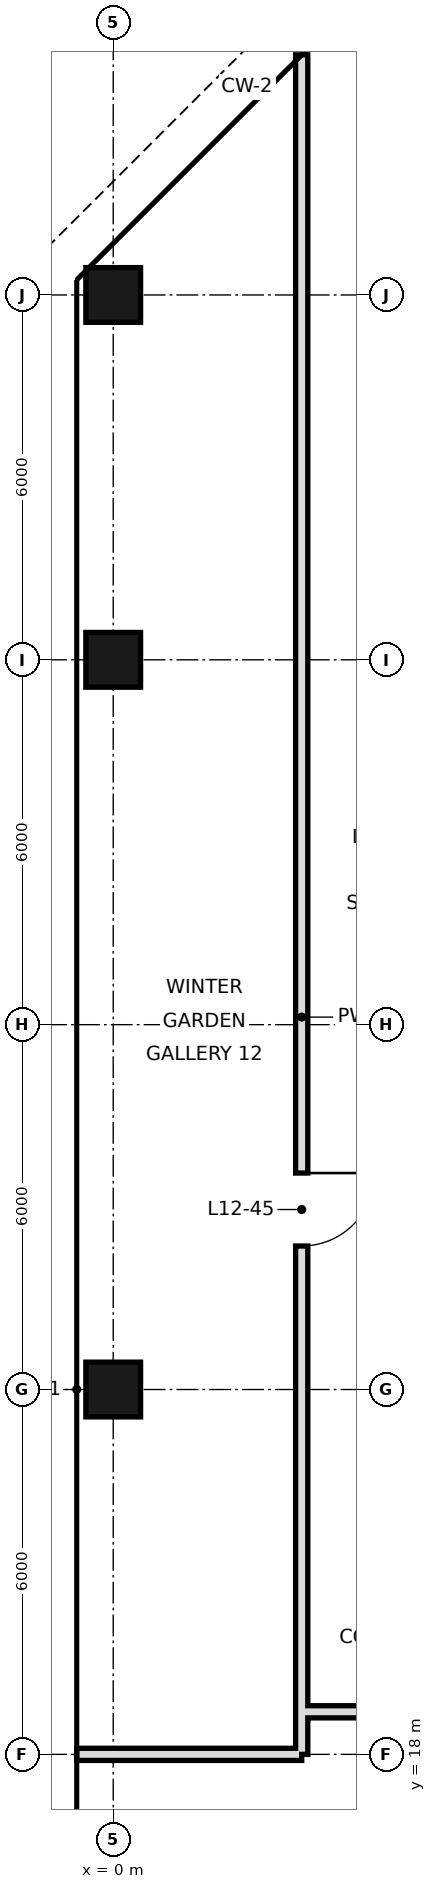
"""IFC4 building model, lengths in metres.
Left out: names, types, materials, properties, quantities, classifications, styles, units other than length and angle.
Written with IfcOpenShell. Run it as: python <this file> out.ifc"""

import sys

from ifc_helpers import new_model, si_unit, direction, frame, frame_2d, origin, origin_2d, place, context, subcontext, project, spatial, rectangle, hollow_rectangle, extrude, element, fill, save


model = new_model("IFC4")
c1 = context("Model", 3, precision=1e-05, world=origin(), true_north=direction((0.0, 1.0)))
c2 = subcontext(c1, "Body", "Model", "MODEL_VIEW")
j1 = project(units=[si_unit("LENGTHUNIT", "METRE"), si_unit("PLANEANGLEUNIT", "RADIAN")], contexts=[c1])
p1 = place(None, origin())
s1 = spatial("IfcSite", under=j1, at=p1, CompositionType="ELEMENT")
p2 = place(p1, origin())
s2 = spatial("IfcBuilding", under=s1, at=p2, CompositionType="ELEMENT")
p3 = place(p2, frame((0.0, 0.0, 64.2)))
s3 = spatial("IfcBuildingStorey", under=s2, at=p3, CompositionType="ELEMENT", Elevation=64.2)
for number, where, z_axis, x_axis in (
    (1, (0.0, 24.0, 0.0), (0.0, 0.0, 1.0), (1.0, 0.0, 0.0)),
    (2, (0.0, 36.0, 0.0), (0.0, 0.0, 1.0), (1.0, 0.0, 0.0)),
    (3, (0.0, 42.0, 0.0), (0.0, 0.0, 1.0), (1.0, 0.0, 0.0)),
):
    element("IfcColumn", number, at=place(p3, frame(where, z_axis=z_axis, x_axis=x_axis)), inside=s3, PredefinedType="COLUMN", context=c2, shape_type="SweptSolid", body=[
        extrude(hollow_rectangle(XDim=0.9, YDim=0.9, WallThickness=0.045, at=origin_2d()), origin(), (0.0, 0.0, 1.0), 3.6),
    ])
p4 = place(p3, frame((3.1, 18.0, 0.0), z_axis=(0.0, 0.0, 1.0), x_axis=(0.0, 1.0, 0.0)))
e4 = element("IfcWall", 4, at=p4, inside=s3, PredefinedType="SOLIDWALL", context=c2, shape_type="SweptSolid", body=[
    extrude(rectangle(XDim=27.949, YDim=0.2, at=frame_2d((13.975, 0.0))), origin(), (0.0, 0.0, 1.0), 2.97),
])
p5 = place(p4, frame((8.36, 0.0, 0.0)))
e5 = element("IfcOpeningElement", 5, at=p5, cuts=e4, PredefinedType="OPENING", context=c2, shape_type="SweptSolid", body=[
    extrude(rectangle(XDim=1.2, YDim=2.4, at=frame_2d((0.6, 1.2))), frame((0.0, 0.11, 0.0), z_axis=(0.0, -1.0, 0.0), x_axis=(1.0, 0.0, 0.0)), (0.0, 0.0, 1.0), 0.22),
])
p6 = place(p3, frame((-0.6, 18.0, 0.0), z_axis=(0.0, 0.0, 1.0), x_axis=(1.0, 0.0, 0.0)))
e6 = element("IfcWall", 6, at=p6, inside=s3, PredefinedType="SOLIDWALL", context=c2, shape_type="SweptSolid", body=[
    extrude(rectangle(XDim=3.7, YDim=0.2, at=frame_2d((1.85, 0.0))), origin(), (0.0, 0.0, 1.0), 2.72),
])
p7 = place(p3, frame((3.1, 18.7, 0.0), z_axis=(0.0, 0.0, 1.0), x_axis=(1.0, 0.0, 0.0)))
e7 = element("IfcWall", 7, at=p7, inside=s3, PredefinedType="SOLIDWALL", context=c2, shape_type="SweptSolid", body=[
    extrude(rectangle(XDim=18.5, YDim=0.2, at=frame_2d((9.25, 0.0))), origin(), (0.0, 0.0, 1.0), 2.72),
])
p8 = place(p5, origin())
e8 = element("IfcDoor", 8, at=p8, inside=s3, OperationType="SINGLE_SWING_RIGHT", PredefinedType="DOOR", context=c2, shape_type="SweptSolid", body=[
    extrude(rectangle(XDim=1.2, YDim=2.4, at=frame_2d((0.6, 1.2))), frame((0.0, 0.025, 0.0), z_axis=(0.0, -1.0, 0.0), x_axis=(1.0, 0.0, 0.0)), (0.0, 0.0, 1.0), 0.05),
])
fill(e5, e8)
save(model, sys.argv[1])
